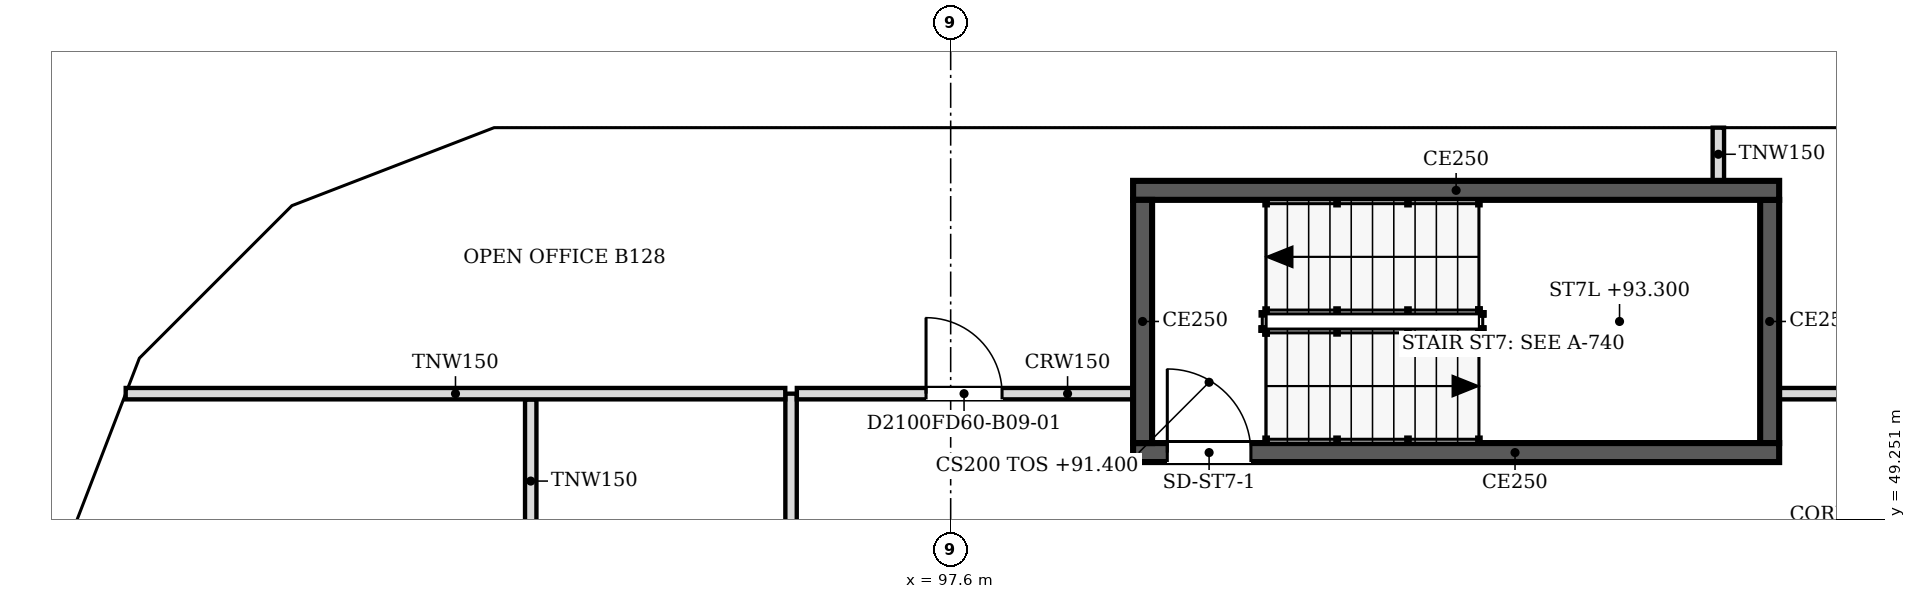
"""IFC4 building model, lengths in metres.
Left out: names, types, materials, properties, quantities, classifications, styles, units other than length and angle.
Written with IfcOpenShell. Run it as: python <this file> out.ifc"""

import sys

from ifc_helpers import new_model, si_unit, direction, frame, frame_2d, origin, place, context, subcontext, project, spatial, polyline, rectangle, outline, extrude, faceted_brep, source, transform, mapped, element, fill, save


model = new_model("IFC4")
c1 = context("Model", 3, precision=1e-05, world=origin(), true_north=direction((0.0, 1.0)))
c2 = subcontext(c1, "Body", "Model", "MODEL_VIEW")
j1 = project(units=[si_unit("LENGTHUNIT", "METRE"), si_unit("PLANEANGLEUNIT", "RADIAN")], contexts=[c1])
p1 = place(None, origin())
s1 = spatial("IfcSite", under=j1, at=p1, CompositionType="ELEMENT")
p2 = place(p1, origin())
s2 = spatial("IfcBuilding", under=s1, at=p2, CompositionType="ELEMENT")
p3 = place(p2, frame((0.0, 0.0, 91.4)))
s3 = spatial("IfcBuildingStorey", under=s2, at=p3, CompositionType="ELEMENT", Elevation=91.4)
m1 = source(origin(), c2, "Body", "SweptSolid", [
    extrude(outline(polyline([(3.05, 0.0), (6.1, 3.8), (3.05, 7.6), (0.0, 3.8), (3.05, 0.0)])), frame((0.0, 0.25, 0.0), z_axis=(0.0, -1.0, 0.0), x_axis=(1.0, 0.0, 0.0)), (0.0, 0.0, 1.0), 0.5),
])
p4 = place(p3, frame((112.85, 54.65, -3.8), z_axis=(0.0, 0.0, 1.0), x_axis=(-1.0, 0.0, 0.0)))
e1 = element("IfcWall", 1, at=p4, inside=s3, PredefinedType="SOLIDWALL", context=c2, shape_type="MappedRepresentation", body=[
    mapped(m1, transform((0.0, 0.0, 0.0), scale=1.0)),
])
m2 = source(origin(), c2, "Body", "SweptSolid", [
    extrude(outline(polyline([(3.05, 0.399), (5.78, 3.8), (3.05, 7.2), (0.321, 3.8), (3.05, 0.399)])), frame((0.0, 0.26, 0.0), z_axis=(0.0, -1.0, 0.0), x_axis=(1.0, 0.0, 0.0)), (0.0, 0.0, 1.0), 0.52),
])
p5 = place(p4, origin())
e2 = element("IfcOpeningElement", 2, at=p5, cuts=e1, PredefinedType="OPENING", context=c2, shape_type="MappedRepresentation", body=[
    mapped(m2, transform((0.0, 0.0, 0.0), scale=1.0)),
])
p6 = place(p3, frame((106.75, 54.65, -3.8), z_axis=(0.0, 0.0, 1.0), x_axis=(-1.0, 0.0, 0.0)))
e3 = element("IfcWall", 3, at=p6, inside=s3, PredefinedType="SOLIDWALL", context=c2, shape_type="MappedRepresentation", body=[
    mapped(m1, transform((0.0, 0.0, 0.0), scale=1.0)),
])
p7 = place(p6, origin())
e4 = element("IfcOpeningElement", 4, at=p7, cuts=e3, PredefinedType="OPENING", context=c2, shape_type="MappedRepresentation", body=[
    mapped(m2, transform((0.0, 0.0, 0.0), scale=1.0)),
])
m3 = source(origin(), c2, "Body", "Brep", [
    faceted_brep([(3.05, -0.25, 0.0), (6.1, -0.25, 3.8), (6.1, -0.25, 3.8), (3.05, -0.25, 7.6), (0.0, -0.25, 3.8), (0.0, 0.25, 3.8), (3.05, 0.25, 7.6), (6.1, 0.25, 3.8), (6.1, 0.25, 3.8), (3.05, 0.25, 0.0)], [[[0, 1, 2, 3, 4]], [[5, 6, 7, 8, 9]], [[9, 8, 1, 0]], [[7, 6, 3, 2]], [[6, 5, 4, 3]], [[5, 9, 0, 4]], [[1, 8, 7, 2]]]),
])
p8 = place(p3, frame((100.65, 54.65, -3.8), z_axis=(0.0, 0.0, 1.0), x_axis=(-1.0, 0.0, 0.0)))
e5 = element("IfcWall", 5, at=p8, inside=s3, PredefinedType="SOLIDWALL", context=c2, shape_type="MappedRepresentation", body=[
    mapped(m3, transform((0.0, 0.0, 0.0), scale=1.0)),
])
p9 = place(p8, origin())
e6 = element("IfcOpeningElement", 6, at=p9, cuts=e5, PredefinedType="OPENING", context=c2, shape_type="MappedRepresentation", body=[
    mapped(m2, transform((0.0, 0.0, 0.0), scale=1.0)),
])
m4 = source(origin(), c2, "Body", "Brep", [
    faceted_brep([(3.003, -0.25, 0.0), (3.05, -0.25, 0.06), (3.05, -0.25, 7.54), (3.003, -0.25, 7.6), (0.0, -0.25, 3.8), (0.0, 0.25, 3.8), (2.957, 0.25, 7.541), (2.957, 0.25, 0.059), (3.003, 0.0, 0.0), (3.003, 0.0, 7.6)], [[[0, 1, 2, 3, 4]], [[5, 6, 7]], [[1, 0, 8]], [[9, 3, 2]], [[6, 5, 4, 3, 9]], [[5, 7, 8, 0, 4]], [[1, 8, 7, 6, 9, 2]]]),
])
p10 = place(p3, frame((94.55, 54.65, -3.8), z_axis=(0.0, 0.0, 1.0), x_axis=(-1.0, 0.0, 0.0)))
e7 = element("IfcWall", 7, at=p10, inside=s3, PredefinedType="SOLIDWALL", context=c2, shape_type="MappedRepresentation", body=[
    mapped(m4, transform((0.0, 0.0, 0.0), scale=1.0)),
])
m5 = source(origin(), c2, "Body", "SweptSolid", [
    extrude(outline(polyline([(2.803, 6.944), (0.319, 3.8), (2.803, 0.656), (2.803, 6.944)])), frame((0.0, 0.26, 0.0), z_axis=(0.0, -1.0, 0.0), x_axis=(1.0, 0.0, 0.0)), (0.0, 0.0, 1.0), 0.52),
])
p11 = place(p10, origin())
e8 = element("IfcOpeningElement", 8, at=p11, cuts=e7, PredefinedType="OPENING", context=c2, shape_type="MappedRepresentation", body=[
    mapped(m5, transform((0.0, 0.0, 0.0), scale=1.0)),
])
m6 = source(origin(), c2, "Body", "Brep", [
    faceted_brep([(0.047, -0.25, 0.0), (2.997, -0.25, 3.8), (0.047, -0.25, 7.6), (0.0, -0.25, 7.541), (0.0, -0.25, 0.059), (0.093, 0.25, 7.54), (2.944, 0.25, 3.868), (2.944, 0.25, 3.732), (0.093, 0.25, 0.06), (2.997, 0.0, 3.8), (0.047, 0.0, 0.0), (0.047, 0.0, 7.6)], [[[0, 1, 2, 3, 4]], [[5, 6, 7, 8]], [[8, 7, 9, 1, 0, 10]], [[6, 5, 11, 2, 1, 9]], [[3, 2, 11]], [[10, 0, 4]], [[8, 10, 4, 3, 11, 5]], [[9, 7, 6]]]),
])
p12 = place(p3, frame((91.59, 54.667, -3.8), z_axis=(0.0, 0.0, 1.0), x_axis=(-0.933000876937, -0.359874094142, 0.0)))
e9 = element("IfcWall", 9, at=p12, inside=s3, PredefinedType="SOLIDWALL", context=c2, shape_type="MappedRepresentation", body=[
    mapped(m6, transform((0.0, 0.0, 0.0), scale=1.0)),
])
m7 = source(origin(), c2, "Body", "SweptSolid", [
    extrude(outline(polyline([(0.247, 0.665), (2.681, 3.8), (0.247, 6.935), (0.247, 0.665)])), frame((0.0, 0.26, 0.0), z_axis=(0.0, -1.0, 0.0), x_axis=(1.0, 0.0, 0.0)), (0.0, 0.0, 1.0), 0.52),
])
p13 = place(p12, origin())
e10 = element("IfcOpeningElement", 10, at=p13, cuts=e9, PredefinedType="OPENING", context=c2, shape_type="MappedRepresentation", body=[
    mapped(m7, transform((0.0, 0.0, 0.0), scale=1.0)),
])
m8 = source(origin(), c2, "Body", "Brep", [
    faceted_brep([(2.944, -0.25, 0.0), (2.997, -0.25, 0.068), (2.997, -0.25, 7.532), (2.944, -0.25, 7.6), (0.0, -0.25, 3.8), (0.053, 0.25, 3.868), (2.891, 0.25, 7.532), (2.891, 0.25, 0.068), (0.053, 0.25, 3.731), (2.944, 0.0, 0.0), (2.944, 0.0, 7.6), (0.0, 0.0, 3.8)], [[[0, 1, 2, 3, 4]], [[5, 6, 7, 8]], [[1, 0, 9]], [[10, 3, 2]], [[6, 5, 11, 4, 3, 10]], [[8, 7, 9, 0, 4, 11]], [[8, 11, 5]], [[1, 9, 7, 6, 10, 2]]]),
])
p14 = place(p3, frame((88.794, 53.588, -3.8), z_axis=(0.0, 0.0, 1.0), x_axis=(-0.707066050402, -0.707147509625, 0.0)))
e11 = element("IfcWall", 11, at=p14, inside=s3, PredefinedType="SOLIDWALL", context=c2, shape_type="MappedRepresentation", body=[
    mapped(m8, transform((0.0, 0.0, 0.0), scale=1.0)),
])
m9 = source(origin(), c2, "Body", "SweptSolid", [
    extrude(outline(polyline([(2.744, 6.934), (0.316, 3.8), (2.744, 0.666), (2.744, 6.934)])), frame((0.0, 0.26, 0.0), z_axis=(0.0, -1.0, 0.0), x_axis=(1.0, 0.0, 0.0)), (0.0, 0.0, 1.0), 0.52),
])
p15 = place(p14, origin())
e12 = element("IfcOpeningElement", 12, at=p15, cuts=e11, PredefinedType="OPENING", context=c2, shape_type="MappedRepresentation", body=[
    mapped(m9, transform((0.0, 0.0, 0.0), scale=1.0)),
])
m10 = source(origin(), c2, "Body", "Brep", [
    faceted_brep([(0.053, -0.25, 0.0), (3.003, -0.25, 3.8), (0.053, -0.25, 7.6), (0.0, -0.25, 7.531), (0.0, -0.25, 0.068), (0.106, 0.25, 7.532), (2.957, 0.25, 3.86), (2.957, 0.25, 3.74), (0.106, 0.25, 0.068), (3.003, 0.0, 3.8), (0.053, 0.0, 0.0), (0.053, 0.0, 7.6)], [[[0, 1, 2, 3, 4]], [[5, 6, 7, 8]], [[8, 7, 9, 1, 0, 10]], [[6, 5, 11, 2, 1, 9]], [[3, 2, 11]], [[10, 0, 4]], [[8, 10, 4, 3, 11, 5]], [[9, 7, 6]]]),
])
p16 = place(p3, frame((86.731, 51.556, -3.8), z_axis=(0.0, 0.0, 1.0), x_axis=(-0.359855894603, -0.933007896601, 0.0)))
e13 = element("IfcWall", 13, at=p16, inside=s3, PredefinedType="SOLIDWALL", context=c2, shape_type="MappedRepresentation", body=[
    mapped(m10, transform((0.0, 0.0, 0.0), scale=1.0)),
])
m11 = source(origin(), c2, "Body", "SweptSolid", [
    extrude(outline(polyline([(0.253, 0.665), (2.687, 3.8), (0.253, 6.935), (0.253, 0.665)])), frame((0.0, 0.26, 0.0), z_axis=(0.0, -1.0, 0.0), x_axis=(1.0, 0.0, 0.0)), (0.0, 0.0, 1.0), 0.52),
])
p17 = place(p16, origin())
e14 = element("IfcOpeningElement", 14, at=p17, cuts=e13, PredefinedType="OPENING", context=c2, shape_type="MappedRepresentation", body=[
    mapped(m11, transform((0.0, 0.0, 0.0), scale=1.0)),
])
m12 = source(origin(), c2, "Body", "SweptSolid", [
    extrude(outline(polyline([(3.05, 0.0), (6.1, 3.8), (0.0, 3.8), (3.05, 0.0)])), frame((0.0, 0.25, 0.0), z_axis=(0.0, -1.0, 0.0), x_axis=(1.0, 0.0, 0.0)), (0.0, 0.0, 1.0), 0.5),
])
p18 = place(p3, frame((109.8, 54.65, 0.0), z_axis=(0.0, 0.0, 1.0), x_axis=(-1.0, 0.0, 0.0)))
e15 = element("IfcWall", 15, at=p18, inside=s3, PredefinedType="SOLIDWALL", context=c2, shape_type="MappedRepresentation", body=[
    mapped(m12, transform((0.0, 0.0, 0.0), scale=1.0)),
])
m13 = source(origin(), c2, "Body", "SweptSolid", [
    extrude(outline(polyline([(3.05, 0.399), (5.579, 3.55), (0.521, 3.55), (3.05, 0.399)])), frame((0.0, 0.26, 0.0), z_axis=(0.0, -1.0, 0.0), x_axis=(1.0, 0.0, 0.0)), (0.0, 0.0, 1.0), 0.52),
])
p19 = place(p18, origin())
e16 = element("IfcOpeningElement", 16, at=p19, cuts=e15, PredefinedType="OPENING", context=c2, shape_type="MappedRepresentation", body=[
    mapped(m13, transform((0.0, 0.0, 0.0), scale=1.0)),
])
m14 = source(origin(), c2, "Body", "Brep", [
    faceted_brep([(3.05, -0.25, 0.0), (6.1, -0.25, 3.8), (6.1, -0.25, 3.8), (0.0, -0.25, 3.8), (0.0, 0.25, 3.8), (6.1, 0.25, 3.8), (6.1, 0.25, 3.8), (3.05, 0.25, 0.0)], [[[0, 1, 2, 3]], [[4, 5, 6, 7]], [[7, 6, 1, 0]], [[5, 4, 3, 2]], [[4, 7, 0, 3]], [[1, 6, 5, 2]]]),
])
p20 = place(p3, frame((103.7, 54.65, 0.0), z_axis=(0.0, 0.0, 1.0), x_axis=(-1.0, 0.0, 0.0)))
e17 = element("IfcWall", 17, at=p20, inside=s3, PredefinedType="SOLIDWALL", context=c2, shape_type="MappedRepresentation", body=[
    mapped(m14, transform((0.0, 0.0, 0.0), scale=1.0)),
])
p21 = place(p20, origin())
e18 = element("IfcOpeningElement", 18, at=p21, cuts=e17, PredefinedType="OPENING", context=c2, shape_type="MappedRepresentation", body=[
    mapped(m13, transform((0.0, 0.0, 0.0), scale=1.0)),
])
m15 = source(origin(), c2, "Body", "Brep", [
    faceted_brep([(3.05, -0.25, 0.0), (6.053, -0.25, 3.8), (0.0, -0.25, 3.8), (0.0, 0.25, 3.8), (6.007, 0.25, 3.8), (6.007, 0.25, 3.741), (3.05, 0.25, 0.0), (6.053, 0.0, 3.8)], [[[0, 1, 2]], [[3, 4, 5, 6]], [[6, 5, 7, 1, 0]], [[4, 3, 2, 1, 7]], [[3, 6, 0, 2]], [[5, 4, 7]]]),
])
p22 = place(p3, frame((97.6, 54.65, 0.0), z_axis=(0.0, 0.0, 1.0), x_axis=(-1.0, 0.0, 0.0)))
e19 = element("IfcWall", 19, at=p22, inside=s3, PredefinedType="SOLIDWALL", context=c2, shape_type="MappedRepresentation", body=[
    mapped(m15, transform((0.0, 0.0, 0.0), scale=1.0)),
])
m16 = source(origin(), c2, "Body", "SweptSolid", [
    extrude(outline(polyline([(3.049, 0.401), (5.537, 3.55), (0.521, 3.55), (3.049, 0.401)])), frame((0.0, 0.26, 0.0), z_axis=(0.0, -1.0, 0.0), x_axis=(1.0, 0.0, 0.0)), (0.0, 0.0, 1.0), 0.52),
])
p23 = place(p22, origin())
e20 = element("IfcOpeningElement", 20, at=p23, cuts=e19, PredefinedType="OPENING", context=c2, shape_type="MappedRepresentation", body=[
    mapped(m16, transform((0.0, 0.0, 0.0), scale=1.0)),
])
m17 = source(origin(), c2, "Body", "Brep", [
    faceted_brep([(2.95, -0.25, 0.0), (3.003, -0.25, 0.068), (3.003, -0.25, 3.8), (0.0, -0.25, 3.8), (0.047, 0.25, 3.8), (2.898, 0.25, 3.8), (2.898, 0.25, 0.068), (0.047, 0.25, 3.74), (2.95, 0.0, 0.0), (0.0, 0.0, 3.8)], [[[0, 1, 2, 3]], [[4, 5, 6, 7]], [[1, 0, 8]], [[5, 4, 9, 3, 2]], [[7, 6, 8, 0, 3, 9]], [[7, 9, 4]], [[1, 8, 6, 5, 2]]]),
])
p24 = place(p3, frame((91.547, 54.65, 0.0), z_axis=(0.0, 0.0, 1.0), x_axis=(-0.933007896601, -0.359855894603, 0.0)))
e21 = element("IfcWall", 21, at=p24, inside=s3, PredefinedType="SOLIDWALL", context=c2, shape_type="MappedRepresentation", body=[
    mapped(m17, transform((0.0, 0.0, 0.0), scale=1.0)),
])
m18 = source(origin(), c2, "Body", "SweptSolid", [
    extrude(outline(polyline([(2.75, 3.55), (0.511, 3.55), (2.75, 0.665), (2.75, 3.55)])), frame((0.0, 0.26, 0.0), z_axis=(0.0, -1.0, 0.0), x_axis=(1.0, 0.0, 0.0)), (0.0, 0.0, 1.0), 0.52),
])
p25 = place(p24, origin())
e22 = element("IfcOpeningElement", 22, at=p25, cuts=e21, PredefinedType="OPENING", context=c2, shape_type="MappedRepresentation", body=[
    mapped(m18, transform((0.0, 0.0, 0.0), scale=1.0)),
])
m19 = source(origin(), c2, "Body", "Brep", [
    faceted_brep([(0.053, -0.25, 0.0), (2.997, -0.25, 3.8), (0.0, -0.25, 3.8), (0.0, -0.25, 0.068), (0.106, 0.25, 3.8), (2.944, 0.25, 3.8), (2.944, 0.25, 3.732), (0.106, 0.25, 0.068), (2.997, 0.0, 3.8), (0.053, 0.0, 0.0)], [[[0, 1, 2, 3]], [[4, 5, 6, 7]], [[7, 6, 8, 1, 0, 9]], [[5, 4, 2, 1, 8]], [[9, 0, 3]], [[7, 9, 3, 2, 4]], [[6, 5, 8]]]),
])
p26 = place(p3, frame((88.831, 53.625, 0.0), z_axis=(0.0, 0.0, 1.0), x_axis=(-0.707147509625, -0.707066050402, 0.0)))
e23 = element("IfcWall", 23, at=p26, inside=s3, PredefinedType="SOLIDWALL", context=c2, shape_type="MappedRepresentation", body=[
    mapped(m19, transform((0.0, 0.0, 0.0), scale=1.0)),
])
m20 = source(origin(), c2, "Body", "SweptSolid", [
    extrude(outline(polyline([(0.253, 0.667), (2.487, 3.55), (0.253, 3.55), (0.253, 0.667)])), frame((0.0, 0.26, 0.0), z_axis=(0.0, -1.0, 0.0), x_axis=(1.0, 0.0, 0.0)), (0.0, 0.0, 1.0), 0.52),
])
p27 = place(p26, origin())
e24 = element("IfcOpeningElement", 24, at=p27, cuts=e23, PredefinedType="OPENING", context=c2, shape_type="MappedRepresentation", body=[
    mapped(m20, transform((0.0, 0.0, 0.0), scale=1.0)),
])
m21 = source(origin(), c2, "Body", "Brep", [
    faceted_brep([(2.95, -0.25, 0.0), (2.997, -0.25, 0.059), (2.997, -0.25, 3.8), (0.0, -0.25, 3.8), (0.053, 0.25, 3.8), (2.904, 0.25, 3.8), (2.904, 0.25, 0.06), (0.053, 0.25, 3.732), (2.95, 0.0, 0.0), (0.0, 0.0, 3.8)], [[[0, 1, 2, 3]], [[4, 5, 6, 7]], [[1, 0, 8]], [[5, 4, 9, 3, 2]], [[7, 6, 8, 0, 3, 9]], [[7, 9, 4]], [[1, 8, 6, 5, 2]]]),
])
p28 = place(p3, frame((86.712, 51.506, 0.0), z_axis=(0.0, 0.0, 1.0), x_axis=(-0.359874094142, -0.933000876937, 0.0)))
e25 = element("IfcWall", 25, at=p28, inside=s3, PredefinedType="SOLIDWALL", context=c2, shape_type="MappedRepresentation", body=[
    mapped(m21, transform((0.0, 0.0, 0.0), scale=1.0)),
])
p29 = place(p28, origin())
e26 = element("IfcOpeningElement", 26, at=p29, cuts=e25, PredefinedType="OPENING", context=c2, shape_type="MappedRepresentation", body=[
    mapped(m18, transform((0.0, 0.0, 0.0), scale=1.0)),
])
p30 = place(p3, frame((108.5, 50.125, 0.0), z_axis=(0.0, 0.0, 1.0), x_axis=(-1.0, 0.0, 0.0)))
e27 = element("IfcWall", 27, at=p30, inside=s3, PredefinedType="SOLIDWALL", context=c2, shape_type="SweptSolid", body=[
    extrude(rectangle(XDim=8.5, YDim=0.25, at=frame_2d((4.25, 0.0))), origin(), (0.0, 0.0, 1.0), 3.8),
])
m22 = source(origin(), c2, "Body", "SweptSolid", [
    extrude(rectangle(XDim=1.1, YDim=2.1, at=frame_2d((0.55, 1.05))), frame((0.0, 0.135, 0.0), z_axis=(0.0, -1.0, 0.0), x_axis=(1.0, 0.0, 0.0)), (0.0, 0.0, 1.0), 0.27),
])
p31 = place(p30, frame((6.95, 0.0, 0.0)))
e28 = element("IfcOpeningElement", 28, at=p31, cuts=e27, PredefinedType="OPENING", context=c2, shape_type="MappedRepresentation", body=[
    mapped(m22, transform((0.0, 0.0, 0.0), scale=1.0)),
])
p32 = place(p3, frame((100.125, 50.25, 0.0), z_axis=(0.0, 0.0, 1.0), x_axis=(0.0, 1.0, 0.0)))
e29 = element("IfcWall", 29, at=p32, inside=s3, PredefinedType="SOLIDWALL", context=c2, shape_type="SweptSolid", body=[
    extrude(rectangle(XDim=3.2, YDim=0.25, at=frame_2d((1.6, 0.0))), origin(), (0.0, 0.0, 1.0), 3.8),
])
p33 = place(p3, frame((100.0, 53.575, 0.0), z_axis=(0.0, 0.0, 1.0), x_axis=(1.0, 0.0, 0.0)))
e30 = element("IfcWall", 30, at=p33, inside=s3, PredefinedType="SOLIDWALL", context=c2, shape_type="SweptSolid", body=[
    extrude(rectangle(XDim=8.5, YDim=0.25, at=frame_2d((4.25, 0.0))), origin(), (0.0, 0.0, 1.0), 3.8),
])
p34 = place(p3, frame((108.375, 53.45, 0.0), z_axis=(0.0, 0.0, 1.0), x_axis=(0.0, -1.0, 0.0)))
e31 = element("IfcWall", 31, at=p34, inside=s3, PredefinedType="SOLIDWALL", context=c2, shape_type="SweptSolid", body=[
    extrude(rectangle(XDim=3.2, YDim=0.25, at=frame_2d((1.6, 0.0))), origin(), (0.0, 0.0, 1.0), 3.8),
])
p35 = place(p3, frame((95.5, 36.6, 0.0), z_axis=(0.0, 0.0, 1.0), x_axis=(0.0, 1.0, 0.0)))
e32 = element("IfcWall", 32, at=p35, inside=s3, PredefinedType="PARTITIONING", context=c2, shape_type="SweptSolid", body=[
    extrude(rectangle(XDim=14.3, YDim=0.15, at=frame_2d((7.15, 0.0))), origin(), (0.0, 0.0, 1.0), 2.895),
])
m23 = source(origin(), c2, "Body", "SweptSolid", [
    extrude(rectangle(XDim=1.0, YDim=2.1, at=frame_2d((0.5, 1.05))), frame((0.0, 0.085, 0.0), z_axis=(0.0, -1.0, 0.0), x_axis=(1.0, 0.0, 0.0)), (0.0, 0.0, 1.0), 0.17),
])
p36 = place(p35, frame((11.101, 0.0, 0.0)))
e33 = element("IfcOpeningElement", 33, at=p36, cuts=e32, PredefinedType="OPENING", context=c2, shape_type="MappedRepresentation", body=[
    mapped(m23, transform((0.0, 0.0, 0.0), scale=1.0)),
])
p37 = place(p35, frame((4.0, 0.0, 0.0)))
e34 = element("IfcOpeningElement", 34, at=p37, cuts=e32, PredefinedType="OPENING", context=c2, shape_type="MappedRepresentation", body=[
    mapped(m23, transform((0.0, 0.0, 0.0), scale=1.0)),
])
p38 = place(p3, frame((92.075, 45.676, 0.0), z_axis=(0.0, 0.0, 1.0), x_axis=(0.0, 1.0, 0.0)))
e35 = element("IfcWall", 35, at=p38, inside=s3, PredefinedType="PARTITIONING", context=c2, shape_type="SweptSolid", body=[
    extrude(rectangle(XDim=5.148, YDim=0.15, at=frame_2d((2.574, 0.0))), origin(), (0.0, 0.0, 1.0), 2.895),
])
m24 = source(origin(), c2, "Body", "SweptSolid", [
    extrude(rectangle(XDim=0.9, YDim=2.1, at=frame_2d((0.45, 1.05))), frame((0.0, 0.085, 0.0), z_axis=(0.0, -1.0, 0.0), x_axis=(1.0, 0.0, 0.0)), (0.0, 0.0, 1.0), 0.17),
])
p39 = place(p38, frame((2.1, 0.0, 0.0)))
e36 = element("IfcOpeningElement", 36, at=p39, cuts=e35, PredefinedType="OPENING", context=c2, shape_type="MappedRepresentation", body=[
    mapped(m24, transform((0.0, 0.0, 0.0), scale=1.0)),
])
p40 = place(p3, frame((86.746, 50.9, 0.0), z_axis=(0.0, 0.0, 1.0), x_axis=(1.0, 0.0, 0.0)))
e37 = element("IfcWall", 37, at=p40, inside=s3, PredefinedType="PARTITIONING", context=c2, shape_type="SweptSolid", body=[
    extrude(rectangle(XDim=8.678, YDim=0.15, at=frame_2d((4.339, 0.0))), origin(), (0.0, 0.0, 1.0), 2.895),
])
p41 = place(p3, frame((95.576, 50.9, 0.0), z_axis=(0.0, 0.0, 1.0), x_axis=(1.0, 0.0, 0.0)))
e38 = element("IfcWall", 38, at=p41, inside=s3, PredefinedType="PARTITIONING", context=c2, shape_type="SweptSolid", body=[
    extrude(rectangle(XDim=4.424, YDim=0.15, at=frame_2d((2.212, 0.0))), origin(), (0.0, 0.0, 1.0), 2.895),
])
p42 = place(p41, frame((1.7, 0.0, 0.0)))
e39 = element("IfcOpeningElement", 39, at=p42, cuts=e38, PredefinedType="OPENING", context=c2, shape_type="MappedRepresentation", body=[
    mapped(m23, transform((0.0, 0.0, 0.0), scale=1.0)),
])
p43 = place(p3, frame((108.5, 50.9, 0.0), z_axis=(0.0, 0.0, 1.0), x_axis=(1.0, 0.0, 0.0)))
e40 = element("IfcWall", 40, at=p43, inside=s3, PredefinedType="PARTITIONING", context=c2, shape_type="SweptSolid", body=[
    extrude(rectangle(XDim=15.6, YDim=0.15, at=frame_2d((7.8, 0.0))), origin(), (0.0, 0.0, 1.0), 2.895),
])
p44 = place(p43, frame((7.3, 0.0, 0.0)))
e41 = element("IfcOpeningElement", 41, at=p44, cuts=e40, PredefinedType="OPENING", context=c2, shape_type="MappedRepresentation", body=[
    mapped(m24, transform((0.0, 0.0, 0.0), scale=1.0)),
])
p45 = place(p3, frame((107.7, 53.7, 0.0), z_axis=(0.0, 0.0, 1.0), x_axis=(0.0, 1.0, 0.0)))
e42 = element("IfcWall", 42, at=p45, inside=s3, PredefinedType="PARTITIONING", context=c2, shape_type="SweptSolid", body=[
    extrude(rectangle(XDim=0.7, YDim=0.15, at=frame_2d((0.35, 0.0))), origin(), (0.0, 0.0, 1.0), 2.895),
])
m25 = source(origin(), c2, "Body", "SweptSolid", [
    extrude(rectangle(XDim=1.1, YDim=2.1, at=frame_2d((0.55, 1.05))), frame((0.0, 0.025, 0.0), z_axis=(0.0, -1.0, 0.0), x_axis=(1.0, 0.0, 0.0)), (0.0, 0.0, 1.0), 0.05),
])
p46 = place(p31, origin())
e43 = element("IfcDoor", 43, at=p46, inside=s3, OperationType="SINGLE_SWING_RIGHT", PredefinedType="DOOR", context=c2, shape_type="MappedRepresentation", body=[
    mapped(m25, transform((0.0, 0.0, 0.0), scale=1.0)),
])
fill(e28, e43)
m26 = source(origin(), c2, "Body", "SweptSolid", [
    extrude(rectangle(XDim=1.0, YDim=2.1, at=frame_2d((0.5, 1.05))), frame((0.0, 0.025, 0.0), z_axis=(0.0, -1.0, 0.0), x_axis=(1.0, 0.0, 0.0)), (0.0, 0.0, 1.0), 0.05),
])
p47 = place(p42, origin())
e44 = element("IfcDoor", 44, at=p47, inside=s3, OperationType="SINGLE_SWING_LEFT", PredefinedType="DOOR", context=c2, shape_type="MappedRepresentation", body=[
    mapped(m26, transform((0.0, 0.0, 0.0), scale=1.0)),
])
fill(e39, e44)
save(model, sys.argv[1])
